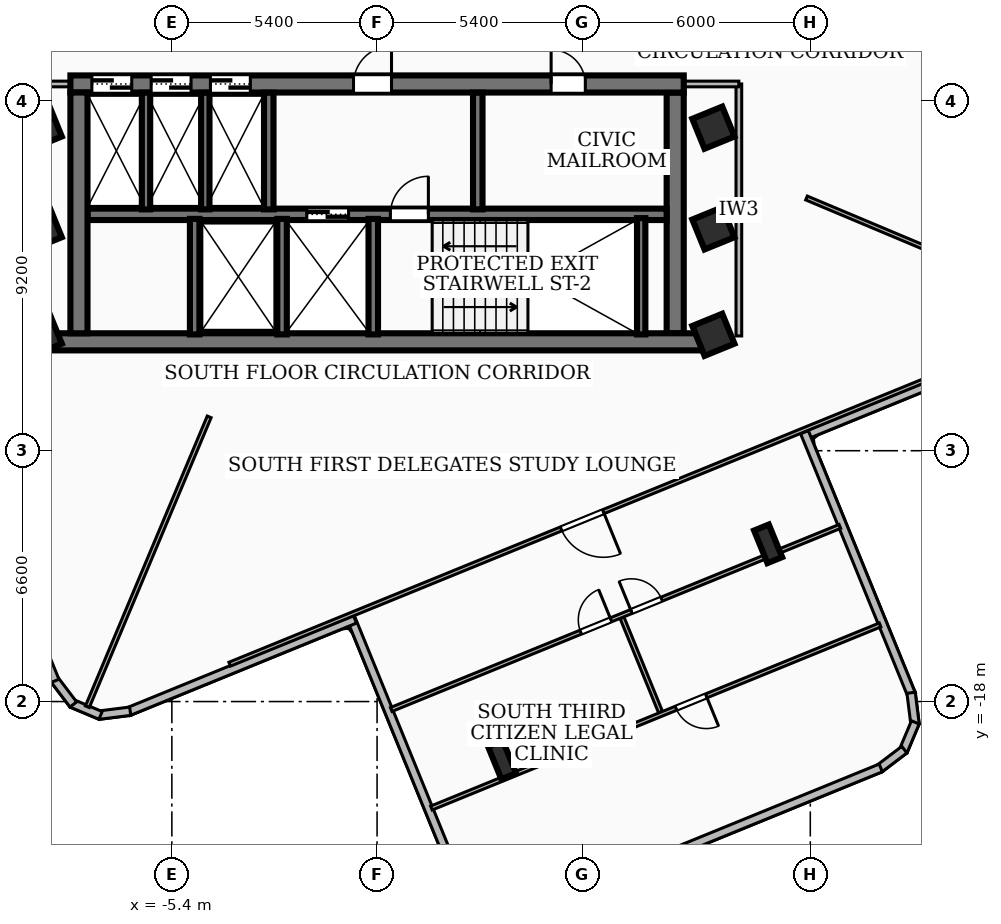
"""IFC4 building model, lengths in metres.
Left out: names, types, materials, properties, quantities, classifications, styles, units other than length and angle.
Written with IfcOpenShell. Run it as: python <this file> out.ifc"""

import sys

from ifc_helpers import new_model, si_unit, direction, frame, frame_2d, origin, origin_2d, place, context, subcontext, project, spatial, rectangle, i_section, extrude, element, fill, save


model = new_model("IFC4")
c1 = context("Model", 3, precision=1e-05, world=origin(), true_north=direction((0.0, 1.0)))
c2 = subcontext(c1, "Body", "Model", "MODEL_VIEW")
j1 = project(units=[si_unit("LENGTHUNIT", "METRE"), si_unit("PLANEANGLEUNIT", "RADIAN")], contexts=[c1])
p1 = place(None, origin())
s1 = spatial("IfcSite", under=j1, at=p1, CompositionType="ELEMENT")
p2 = place(p1, origin())
s2 = spatial("IfcBuilding", under=s1, at=p2, CompositionType="ELEMENT")
p3 = place(p2, frame((0.0, 0.0, 173.88)))
s3 = spatial("IfcBuildingStorey", under=s2, at=p3, CompositionType="ELEMENT", Elevation=173.88)
p4 = place(p3, frame((8.78, -8.535, 0.0), z_axis=(0.0, 0.0, 1.0), x_axis=(-1.0, 0.0, 0.0)))
e1 = element("IfcWall", 1, at=p4, inside=s3, PredefinedType="SHEAR", context=c2, shape_type="SweptSolid", body=[
    extrude(rectangle(XDim=17.56, YDim=0.45, at=frame_2d((8.78, 0.0))), origin(), (0.0, 0.0, 1.0), 3.34),
])
p5 = place(p3, frame((-8.07, -1.75, 0.0), z_axis=(0.0, 0.0, 1.0), x_axis=(1.0, 0.0, 0.0)))
e2 = element("IfcWall", 2, at=p5, inside=s3, PredefinedType="SHEAR", context=c2, shape_type="SweptSolid", body=[
    extrude(rectangle(XDim=16.14, YDim=0.45, at=frame_2d((8.07, 0.0))), origin(), (0.0, 0.0, 1.0), 3.34),
])
p6 = place(p5, frame((7.45, 0.0, 0.0)))
e3 = element("IfcOpeningElement", 3, at=p6, cuts=e2, PredefinedType="OPENING", context=c2, shape_type="SweptSolid", body=[
    extrude(rectangle(XDim=1.0, YDim=2.1, at=frame_2d((0.5, 1.05))), frame((0.0, 0.235, 0.0), z_axis=(0.0, -1.0, 0.0), x_axis=(1.0, 0.0, 0.0)), (0.0, 0.0, 1.0), 0.47),
])
p7 = place(p5, frame((12.65, 0.0, 0.0)))
e4 = element("IfcOpeningElement", 4, at=p7, cuts=e2, PredefinedType="OPENING", context=c2, shape_type="SweptSolid", body=[
    extrude(rectangle(XDim=0.9, YDim=2.06, at=frame_2d((0.45, 1.03))), frame((0.0, 0.235, 0.0), z_axis=(0.0, -1.0, 0.0), x_axis=(1.0, 0.0, 0.0)), (0.0, 0.0, 1.0), 0.47),
])
p8 = place(p5, frame((0.565, 0.0, 0.0)))
e5 = element("IfcOpeningElement", 5, at=p8, cuts=e2, PredefinedType="OPENING", context=c2, shape_type="SweptSolid", body=[
    extrude(rectangle(XDim=1.05, YDim=2.15, at=frame_2d((0.525, 1.075))), frame((0.0, 0.235, 0.0), z_axis=(0.0, -1.0, 0.0), x_axis=(1.0, 0.0, 0.0)), (0.0, 0.0, 1.0), 0.47),
])
p9 = place(p5, frame((2.125, 0.0, 0.0)))
e6 = element("IfcOpeningElement", 6, at=p9, cuts=e2, PredefinedType="OPENING", context=c2, shape_type="SweptSolid", body=[
    extrude(rectangle(XDim=1.05, YDim=2.15, at=frame_2d((0.525, 1.075))), frame((0.0, 0.235, 0.0), z_axis=(0.0, -1.0, 0.0), x_axis=(1.0, 0.0, 0.0)), (0.0, 0.0, 1.0), 0.47),
])
p10 = place(p5, frame((3.685, 0.0, 0.0)))
e7 = element("IfcOpeningElement", 7, at=p10, cuts=e2, PredefinedType="OPENING", context=c2, shape_type="SweptSolid", body=[
    extrude(rectangle(XDim=1.05, YDim=2.15, at=frame_2d((0.525, 1.075))), frame((0.0, 0.235, 0.0), z_axis=(0.0, -1.0, 0.0), x_axis=(1.0, 0.0, 0.0)), (0.0, 0.0, 1.0), 0.47),
])
for number, where, z_axis, x_axis in (
    (8, (-7.845, -8.31, 0.0), (0.0, 0.0, 1.0), (0.0, 1.0, 0.0)),
    (9, (7.845, -1.975, 0.0), (0.0, 0.0, 1.0), (0.0, -1.0, 0.0)),
):
    element("IfcWall", number, at=place(p3, frame(where, z_axis=z_axis, x_axis=x_axis)), inside=s3, PredefinedType="SHEAR", context=c2, shape_type="SweptSolid", body=[
        extrude(rectangle(XDim=6.335, YDim=0.45, at=frame_2d((3.167, 0.0))), origin(), (0.0, 0.0, 1.0), 3.34),
    ])
p11 = place(p3, frame((-7.62, -5.18, 0.0), z_axis=(0.0, 0.0, 1.0), x_axis=(1.0, 0.0, 0.0)))
e10 = element("IfcWall", 10, at=p11, inside=s3, PredefinedType="SOLIDWALL", context=c2, shape_type="SweptSolid", body=[
    extrude(rectangle(XDim=15.24, YDim=0.3, at=frame_2d((7.62, 0.0))), origin(), (0.0, 0.0, 1.0), 3.34),
])
p12 = place(p11, frame((5.77, 0.0, 0.0)))
e11 = element("IfcOpeningElement", 11, at=p12, cuts=e10, PredefinedType="OPENING", context=c2, shape_type="SweptSolid", body=[
    extrude(rectangle(XDim=1.1, YDim=2.15, at=frame_2d((0.55, 1.075))), frame((0.0, 0.16, 0.0), z_axis=(0.0, -1.0, 0.0), x_axis=(1.0, 0.0, 0.0)), (0.0, 0.0, 1.0), 0.32),
])
p13 = place(p11, frame((7.97, 0.0, 0.0)))
e12 = element("IfcOpeningElement", 12, at=p13, cuts=e10, PredefinedType="OPENING", context=c2, shape_type="SweptSolid", body=[
    extrude(rectangle(XDim=1.0, YDim=2.1, at=frame_2d((0.5, 1.05))), frame((0.0, 0.16, 0.0), z_axis=(0.0, -1.0, 0.0), x_axis=(1.0, 0.0, 0.0)), (0.0, 0.0, 1.0), 0.32),
])
p14 = place(p3, frame((6.95, -8.34, 0.0), z_axis=(0.0, 0.0, 1.0), x_axis=(0.0, 1.0, 0.0)))
e13 = element("IfcWall", 13, at=p14, inside=s3, PredefinedType="SOLIDWALL", context=c2, shape_type="SweptSolid", body=[
    extrude(rectangle(XDim=3.06, YDim=0.22, at=frame_2d((1.53, 0.0))), origin(), (0.0, 0.0, 1.0), 3.34),
])
for number, where, z_axis, x_axis in (
    (14, (-0.1, -8.34, 0.0), (0.0, 0.0, 1.0), (0.0, 1.0, 0.0)),
    (15, (-2.5, -8.34, 0.0), (0.0, 0.0, 1.0), (0.0, 1.0, 0.0)),
    (16, (-4.8, -8.34, 0.0), (0.0, 0.0, 1.0), (0.0, 1.0, 0.0)),
):
    element("IfcWall", number, at=place(p3, frame(where, z_axis=z_axis, x_axis=x_axis)), inside=s3, PredefinedType="SOLIDWALL", context=c2, shape_type="SweptSolid", body=[
        extrude(rectangle(XDim=3.04, YDim=0.25, at=frame_2d((1.52, 0.0))), origin(), (0.0, 0.0, 1.0), 3.34),
    ])
for number, where, z_axis, x_axis in (
    (17, (-2.85, -5.05, 0.0), (0.0, 0.0, 1.0), (0.0, 1.0, 0.0)),
    (18, (2.65, -5.05, 0.0), (0.0, 0.0, 1.0), (0.0, 1.0, 0.0)),
):
    element("IfcWall", number, at=place(p3, frame(where, z_axis=z_axis, x_axis=x_axis)), inside=s3, PredefinedType="SOLIDWALL", context=c2, shape_type="SweptSolid", body=[
        extrude(rectangle(XDim=3.07, YDim=0.25, at=frame_2d((1.535, 0.0))), origin(), (0.0, 0.0, 1.0), 3.34),
    ])
for number, where, z_axis, x_axis in (
    (19, (-6.08, -5.05, 0.0), (0.0, 0.0, 1.0), (0.0, 1.0, 0.0)),
    (20, (-4.52, -5.05, 0.0), (0.0, 0.0, 1.0), (0.0, 1.0, 0.0)),
):
    element("IfcWall", number, at=place(p3, frame(where, z_axis=z_axis, x_axis=x_axis)), inside=s3, PredefinedType="SOLIDWALL", context=c2, shape_type="SweptSolid", body=[
        extrude(rectangle(XDim=3.07, YDim=0.22, at=frame_2d((1.535, 0.0))), origin(), (0.0, 0.0, 1.0), 3.34),
    ])
for number, where, z_axis, x_axis in (
    (21, (-8.85, -5.55, 0.0), (0.0, 0.0, 1.0), (0.926, 0.378, 0.0)),
    (22, (-8.85, -2.9, 0.0), (0.0, 0.0, 1.0), (0.926, 0.378, 0.0)),
    (23, (8.85, -5.55, 0.0), (0.0, 0.0, 1.0), (0.926, 0.378, 0.0)),
    (24, (8.85, -2.9, 0.0), (0.0, 0.0, 1.0), (0.926, 0.378, 0.0)),
    (25, (8.85, -8.35, 0.0), (0.0, 0.0, 1.0), (0.926, 0.378, 0.0)),
    (26, (-8.85, -8.35, 0.0), (0.0, 0.0, 1.0), (0.926, 0.378, 0.0)),
):
    element("IfcColumn", number, at=place(p3, frame(where, z_axis=z_axis, x_axis=x_axis)), inside=s3, PredefinedType="COLUMN", context=c2, shape_type="SweptSolid", body=[
        extrude(rectangle(XDim=0.85, YDim=0.85, at=origin_2d()), origin(), (0.0, 0.0, 1.0), 3.6),
    ])
for number, where, z_axis, x_axis in (
    (27, (3.29, -19.536, 0.0), (0.0, 0.0, 1.0), (0.926, 0.378, 0.0)),
    (28, (10.29, -13.85, 0.0), (0.0, 0.0, 1.0), (0.926, 0.378, 0.0)),
):
    element("IfcColumn", number, at=place(p3, frame(where, z_axis=z_axis, x_axis=x_axis)), inside=s3, PredefinedType="COLUMN", context=c2, shape_type="SweptSolid", body=[
        extrude(i_section(OverallWidth=0.418, OverallDepth=0.927, WebThickness=0.019, FlangeThickness=0.032, at=origin_2d()), origin(), (0.0, 0.0, 1.0), 3.6),
    ])
p15 = place(p3, frame((17.456, -8.473, 0.0), z_axis=(0.0, 0.0, 1.0), x_axis=(-0.925916493636, -0.377728271133, 0.0)))
e29 = element("IfcWall", 29, at=p15, inside=s3, PredefinedType="SOLIDWALL", context=c2, shape_type="SweptSolid", body=[
    extrude(rectangle(XDim=6.759, YDim=0.22, at=frame_2d((3.379, 0.0))), origin(), (0.0, 0.0, 1.0), 3.34),
])
p16 = place(p3, frame((11.246, -10.912, 0.0), z_axis=(0.0, 0.0, 1.0), x_axis=(0.377850036169, -0.925866810166, 0.0)))
e30 = element("IfcWall", 30, at=p16, inside=s3, PredefinedType="SOLIDWALL", context=c2, shape_type="SweptSolid", body=[
    extrude(rectangle(XDim=7.458, YDim=0.22, at=frame_2d((3.729, 0.0))), origin(), (0.0, 0.0, 1.0), 3.34),
])
p17 = place(p3, frame((14.052, -17.769, 0.0), z_axis=(0.0, 0.0, 1.0), x_axis=(0.124646916858, -0.992201162123, 0.0)))
e31 = element("IfcWall", 31, at=p17, inside=s3, PredefinedType="SOLIDWALL", context=c2, shape_type="SweptSolid", body=[
    extrude(rectangle(XDim=0.834, YDim=0.22, at=frame_2d((0.417, 0.0))), origin(), (0.0, 0.0, 1.0), 3.34),
])
p18 = place(p3, frame((14.163, -18.549, 0.0), z_axis=(0.0, 0.0, 1.0), x_axis=(-0.388336782412, -0.92151752204, 0.0)))
e32 = element("IfcWall", 32, at=p18, inside=s3, PredefinedType="SOLIDWALL", context=c2, shape_type="SweptSolid", body=[
    extrude(rectangle(XDim=0.819, YDim=0.22, at=frame_2d((0.41, 0.0))), origin(), (0.0, 0.0, 1.0), 3.34),
])
p19 = place(p3, frame((13.875, -19.266, 0.0), z_axis=(0.0, 0.0, 1.0), x_axis=(-0.796613459657, -0.604489037034, 0.0)))
e33 = element("IfcWall", 33, at=p19, inside=s3, PredefinedType="SOLIDWALL", context=c2, shape_type="SweptSolid", body=[
    extrude(rectangle(XDim=0.833, YDim=0.22, at=frame_2d((0.417, 0.0))), origin(), (0.0, 0.0, 1.0), 3.34),
])
p20 = place(p3, frame((13.254, -19.746, 0.0), z_axis=(0.0, 0.0, 1.0), x_axis=(-0.925876400685, -0.377826535137, 0.0)))
e34 = element("IfcWall", 34, at=p20, inside=s3, PredefinedType="SOLIDWALL", context=c2, shape_type="SweptSolid", body=[
    extrude(rectangle(XDim=9.941, YDim=0.22, at=frame_2d((4.97, 0.0))), origin(), (0.0, 0.0, 1.0), 3.34),
])
p21 = place(p20, frame((6.854, 0.0, 0.85)))
e35 = element("IfcOpeningElement", 35, at=p21, cuts=e34, PredefinedType="OPENING", context=c2, shape_type="SweptSolid", body=[
    extrude(rectangle(XDim=1.8, YDim=1.8, at=frame_2d((0.9, 0.9))), frame((0.0, 0.12, 0.0), z_axis=(0.0, -1.0, 0.0), x_axis=(1.0, 0.0, 0.0)), (0.0, 0.0, 1.0), 0.24),
])
p22 = place(p3, frame((2.12, -22.691, 0.0), z_axis=(0.0, 0.0, 1.0), x_axis=(-0.377754391584, 0.92590583735, 0.0)))
e36 = element("IfcWall", 36, at=p22, inside=s3, PredefinedType="SOLIDWALL", context=c2, shape_type="SweptSolid", body=[
    extrude(rectangle(XDim=7.458, YDim=0.22, at=frame_2d((3.729, 0.0))), origin(), (0.0, 0.0, 1.0), 2.644),
])
p23 = place(p3, frame((-0.583, -15.834, 0.0), z_axis=(0.0, 0.0, 1.0), x_axis=(-0.925896916469, -0.377776256629, 0.0)))
e37 = element("IfcWall", 37, at=p23, inside=s3, PredefinedType="SOLIDWALL", context=c2, shape_type="SweptSolid", body=[
    extrude(rectangle(XDim=6.438, YDim=0.22, at=frame_2d((3.219, 0.0))), origin(), (0.0, 0.0, 1.0), 2.644),
])
p24 = place(p3, frame((-6.496, -18.254, 0.0), z_axis=(0.0, 0.0, 1.0), x_axis=(-0.992201162123, -0.124646916858, 0.0)))
e38 = element("IfcWall", 38, at=p24, inside=s3, PredefinedType="SOLIDWALL", context=c2, shape_type="SweptSolid", body=[
    extrude(rectangle(XDim=0.834, YDim=0.22, at=frame_2d((0.417, 0.0))), origin(), (0.0, 0.0, 1.0), 3.34),
])
p25 = place(p3, frame((-7.276, -18.365, 0.0), z_axis=(0.0, 0.0, 1.0), x_axis=(-0.9216690265, 0.387977068381, 0.0)))
e39 = element("IfcWall", 39, at=p25, inside=s3, PredefinedType="SOLIDWALL", context=c2, shape_type="SweptSolid", body=[
    extrude(rectangle(XDim=0.819, YDim=0.22, at=frame_2d((0.41, 0.0))), origin(), (0.0, 0.0, 1.0), 3.34),
])
p26 = place(p3, frame((-7.993, -18.077, 0.0), z_axis=(0.0, 0.0, 1.0), x_axis=(-0.604815890473, 0.796365329878, 0.0)))
e40 = element("IfcWall", 40, at=p26, inside=s3, PredefinedType="SOLIDWALL", context=c2, shape_type="SweptSolid", body=[
    extrude(rectangle(XDim=0.833, YDim=0.22, at=frame_2d((0.417, 0.0))), origin(), (0.0, 0.0, 1.0), 3.34),
])
p27 = place(p3, frame((-8.473, -17.456, 0.0), z_axis=(0.0, 0.0, 1.0), x_axis=(-0.377728271133, 0.925916493636, 0.0)))
e41 = element("IfcWall", 41, at=p27, inside=s3, PredefinedType="SOLIDWALL", context=c2, shape_type="SweptSolid", body=[
    extrude(rectangle(XDim=6.759, YDim=0.22, at=frame_2d((3.379, 0.0))), origin(), (0.0, 0.0, 1.0), 2.72),
])
p28 = place(p3, frame((-7.85, -1.75, 0.0), z_axis=(0.0, 0.0, 1.0), x_axis=(-1.0, 0.0, 0.0)))
e42 = element("IfcWall", 42, at=p28, inside=s3, PredefinedType="PARTITIONING", context=c2, shape_type="SweptSolid", body=[
    extrude(rectangle(XDim=1.67, YDim=0.15, at=frame_2d((0.835, 0.0))), origin(), (0.0, 0.0, 1.0), 2.57),
])
p29 = place(p3, frame((9.52, -8.38, 0.0), z_axis=(0.0, 0.0, 1.0), x_axis=(0.0, 1.0, 0.0)))
e43 = element("IfcWall", 43, at=p29, inside=s3, PredefinedType="PARTITIONING", context=c2, shape_type="SweptSolid", body=[
    extrude(rectangle(XDim=6.63, YDim=0.15, at=frame_2d((3.315, 0.0))), origin(), (0.0, 0.0, 1.0), 3.34),
])
p30 = place(p3, frame((7.85, -1.75, 0.0), z_axis=(0.0, 0.0, 1.0), x_axis=(1.0, 0.0, 0.0)))
e44 = element("IfcWall", 44, at=p30, inside=s3, PredefinedType="PARTITIONING", context=c2, shape_type="SweptSolid", body=[
    extrude(rectangle(XDim=1.67, YDim=0.15, at=frame_2d((0.835, 0.0))), origin(), (0.0, 0.0, 1.0), 2.57),
])
p31 = place(p3, frame((-4.418, -10.509, 0.0), z_axis=(0.0, 0.0, 1.0), x_axis=(-0.387471247296, -0.921881788799, 0.0)))
e45 = element("IfcWall", 45, at=p31, inside=s3, PredefinedType="PARTITIONING", context=c2, shape_type="SweptSolid", body=[
    extrude(rectangle(XDim=8.274, YDim=0.11, at=frame_2d((4.137, 0.0))), origin(), (0.0, 0.0, 1.0), 2.644),
])
p32 = place(p3, frame((11.3, -4.75, 0.0), z_axis=(0.0, 0.0, 1.0), x_axis=(0.92186077199, -0.387521247245, 0.0)))
e46 = element("IfcWall", 46, at=p32, inside=s3, PredefinedType="PARTITIONING", context=c2, shape_type="SweptSolid", body=[
    extrude(rectangle(XDim=7.417, YDim=0.11, at=frame_2d((3.708, 0.0))), origin(), (0.0, 0.0, 1.0), 3.34),
])
p33 = place(p3, frame((9.323, 14.973, 0.0), z_axis=(0.0, 0.0, 1.0), x_axis=(0.377891753295, -0.92584978414, 0.0)))
e47 = element("IfcWall", 47, at=p33, inside=s3, PredefinedType="PARTITIONING", context=c2, shape_type="SweptSolid", body=[
    extrude(rectangle(XDim=20.361, YDim=0.11, at=frame_2d((10.18, 0.0))), origin(), (0.0, 0.0, 1.0), 2.644),
])
p34 = place(p33, frame((9.741, 0.0, 0.0)))
e48 = element("IfcOpeningElement", 48, at=p34, cuts=e47, PredefinedType="OPENING", context=c2, shape_type="SweptSolid", body=[
    extrude(rectangle(XDim=1.2, YDim=2.1, at=frame_2d((0.6, 1.05))), frame((0.0, 0.065, 0.0), z_axis=(0.0, -1.0, 0.0), x_axis=(1.0, 0.0, 0.0)), (0.0, 0.0, 1.0), 0.13),
])
p35 = place(p3, frame((14.973, -9.323, 0.0), z_axis=(0.0, 0.0, 1.0), x_axis=(-0.92584978414, -0.377891753295, 0.0)))
e49 = element("IfcWall", 49, at=p35, inside=s3, PredefinedType="PARTITIONING", context=c2, shape_type="SweptSolid", body=[
    extrude(rectangle(XDim=20.361, YDim=0.11, at=frame_2d((10.18, 0.0))), origin(), (0.0, 0.0, 1.0), 2.644),
])
p36 = place(p35, frame((9.741, 0.0, 0.0)))
e50 = element("IfcOpeningElement", 50, at=p36, cuts=e49, PredefinedType="OPENING", context=c2, shape_type="SweptSolid", body=[
    extrude(rectangle(XDim=1.2, YDim=2.1, at=frame_2d((0.6, 1.05))), frame((0.0, 0.065, 0.0), z_axis=(0.0, -1.0, 0.0), x_axis=(1.0, 0.0, 0.0)), (0.0, 0.0, 1.0), 0.13),
])
p37 = place(p3, frame((6.446, -15.795, 0.0), z_axis=(0.0, 0.0, 1.0), x_axis=(0.377834865886, -0.925873001076, 0.0)))
e51 = element("IfcWall", 51, at=p37, inside=s3, PredefinedType="PARTITIONING", context=c2, shape_type="SweptSolid", body=[
    extrude(rectangle(XDim=2.681, YDim=0.11, at=frame_2d((1.34, 0.0))), origin(), (0.0, 0.0, 1.0), 3.34),
])
p38 = place(p3, frame((0.373, -18.209, 0.0), z_axis=(0.0, 0.0, 1.0), x_axis=(0.925887289182, 0.377799851417, 0.0)))
e52 = element("IfcWall", 52, at=p38, inside=s3, PredefinedType="PARTITIONING", context=c2, shape_type="SweptSolid", body=[
    extrude(rectangle(XDim=12.75, YDim=0.11, at=frame_2d((6.375, 0.0))), origin(), (0.0, 0.0, 1.0), 2.644),
])
p39 = place(p38, frame((5.385, 0.0, 0.0)))
e53 = element("IfcOpeningElement", 53, at=p39, cuts=e52, PredefinedType="OPENING", context=c2, shape_type="SweptSolid", body=[
    extrude(rectangle(XDim=0.86, YDim=2.04, at=frame_2d((0.43, 1.02))), frame((0.0, 0.065, 0.0), z_axis=(0.0, -1.0, 0.0), x_axis=(1.0, 0.0, 0.0)), (0.0, 0.0, 1.0), 0.13),
])
p40 = place(p38, frame((6.825, 0.0, 0.0)))
e54 = element("IfcOpeningElement", 54, at=p40, cuts=e52, PredefinedType="OPENING", context=c2, shape_type="SweptSolid", body=[
    extrude(rectangle(XDim=0.86, YDim=2.04, at=frame_2d((0.43, 1.02))), frame((0.0, 0.065, 0.0), z_axis=(0.0, -1.0, 0.0), x_axis=(1.0, 0.0, 0.0)), (0.0, 0.0, 1.0), 0.13),
])
p41 = place(p3, frame((13.236, -15.984, 0.0), z_axis=(0.0, 0.0, 1.0), x_axis=(-0.92585653016, -0.377875224856, 0.0)))
e55 = element("IfcWall", 55, at=p41, inside=s3, PredefinedType="PARTITIONING", context=c2, shape_type="SweptSolid", body=[
    extrude(rectangle(XDim=12.75, YDim=0.11, at=frame_2d((6.375, 0.0))), origin(), (0.0, 0.0, 1.0), 3.34),
])
p42 = place(p41, frame((4.94, 0.0, 0.0)))
e56 = element("IfcOpeningElement", 56, at=p42, cuts=e55, PredefinedType="OPENING", context=c2, shape_type="SweptSolid", body=[
    extrude(rectangle(XDim=0.86, YDim=2.04, at=frame_2d((0.43, 1.02))), frame((0.0, 0.065, 0.0), z_axis=(0.0, -1.0, 0.0), x_axis=(1.0, 0.0, 0.0)), (0.0, 0.0, 1.0), 0.13),
])
p43 = place(p6, origin())
e57 = element("IfcDoor", 57, at=p43, inside=s3, OperationType="SINGLE_SWING_RIGHT", PredefinedType="DOOR", context=c2, shape_type="SweptSolid", body=[
    extrude(rectangle(XDim=1.0, YDim=2.1, at=frame_2d((0.5, 1.05))), frame((0.0, 0.025, 0.0), z_axis=(0.0, -1.0, 0.0), x_axis=(1.0, 0.0, 0.0)), (0.0, 0.0, 1.0), 0.05),
])
fill(e3, e57)
p44 = place(p12, origin())
e58 = element("IfcDoor", 58, at=p44, inside=s3, OperationType="DOUBLE_DOOR_SLIDING", PredefinedType="DOOR", context=c2, shape_type="SweptSolid", body=[
    extrude(rectangle(XDim=1.1, YDim=2.15, at=frame_2d((0.55, 1.075))), frame((0.0, 0.025, 0.0), z_axis=(0.0, -1.0, 0.0), x_axis=(1.0, 0.0, 0.0)), (0.0, 0.0, 1.0), 0.05),
])
fill(e11, e58)
p45 = place(p13, origin())
e59 = element("IfcDoor", 59, at=p45, inside=s3, OperationType="SINGLE_SWING_RIGHT", PredefinedType="DOOR", context=c2, shape_type="SweptSolid", body=[
    extrude(rectangle(XDim=1.0, YDim=2.1, at=frame_2d((0.5, 1.05))), frame((0.0, 0.025, 0.0), z_axis=(0.0, -1.0, 0.0), x_axis=(1.0, 0.0, 0.0)), (0.0, 0.0, 1.0), 0.05),
])
fill(e12, e59)
p46 = place(p7, origin())
e60 = element("IfcDoor", 60, at=p46, inside=s3, OperationType="SINGLE_SWING_LEFT", PredefinedType="DOOR", context=c2, shape_type="SweptSolid", body=[
    extrude(rectangle(XDim=0.9, YDim=2.06, at=frame_2d((0.45, 1.03))), frame((0.0, 0.025, 0.0), z_axis=(0.0, -1.0, 0.0), x_axis=(1.0, 0.0, 0.0)), (0.0, 0.0, 1.0), 0.05),
])
fill(e4, e60)
p47 = place(p8, origin())
e61 = element("IfcDoor", 61, at=p47, inside=s3, OperationType="DOUBLE_DOOR_SLIDING", PredefinedType="DOOR", context=c2, shape_type="SweptSolid", body=[
    extrude(rectangle(XDim=1.05, YDim=2.15, at=frame_2d((0.525, 1.075))), frame((0.0, 0.025, 0.0), z_axis=(0.0, -1.0, 0.0), x_axis=(1.0, 0.0, 0.0)), (0.0, 0.0, 1.0), 0.05),
])
fill(e5, e61)
p48 = place(p9, origin())
e62 = element("IfcDoor", 62, at=p48, inside=s3, OperationType="DOUBLE_DOOR_SLIDING", PredefinedType="DOOR", context=c2, shape_type="SweptSolid", body=[
    extrude(rectangle(XDim=1.05, YDim=2.15, at=frame_2d((0.525, 1.075))), frame((0.0, 0.025, 0.0), z_axis=(0.0, -1.0, 0.0), x_axis=(1.0, 0.0, 0.0)), (0.0, 0.0, 1.0), 0.05),
])
fill(e6, e62)
p49 = place(p10, origin())
e63 = element("IfcDoor", 63, at=p49, inside=s3, OperationType="DOUBLE_DOOR_SLIDING", PredefinedType="DOOR", context=c2, shape_type="SweptSolid", body=[
    extrude(rectangle(XDim=1.05, YDim=2.15, at=frame_2d((0.525, 1.075))), frame((0.0, 0.025, 0.0), z_axis=(0.0, -1.0, 0.0), x_axis=(1.0, 0.0, 0.0)), (0.0, 0.0, 1.0), 0.05),
])
fill(e7, e63)
p50 = place(p36, origin())
e64 = element("IfcDoor", 64, at=p50, inside=s3, OperationType="SINGLE_SWING_LEFT", PredefinedType="DOOR", context=c2, shape_type="SweptSolid", body=[
    extrude(rectangle(XDim=1.2, YDim=2.1, at=frame_2d((0.6, 1.05))), frame((0.0, 0.025, 0.0), z_axis=(0.0, -1.0, 0.0), x_axis=(1.0, 0.0, 0.0)), (0.0, 0.0, 1.0), 0.05),
])
fill(e50, e64)
p51 = place(p39, origin())
e65 = element("IfcDoor", 65, at=p51, inside=s3, OperationType="SINGLE_SWING_RIGHT", PredefinedType="DOOR", context=c2, shape_type="SweptSolid", body=[
    extrude(rectangle(XDim=0.86, YDim=2.04, at=frame_2d((0.43, 1.02))), frame((0.0, 0.025, 0.0), z_axis=(0.0, -1.0, 0.0), x_axis=(1.0, 0.0, 0.0)), (0.0, 0.0, 1.0), 0.05),
])
fill(e53, e65)
p52 = place(p40, origin())
e66 = element("IfcDoor", 66, at=p52, inside=s3, OperationType="SINGLE_SWING_LEFT", PredefinedType="DOOR", context=c2, shape_type="SweptSolid", body=[
    extrude(rectangle(XDim=0.86, YDim=2.04, at=frame_2d((0.43, 1.02))), frame((0.0, 0.025, 0.0), z_axis=(0.0, -1.0, 0.0), x_axis=(1.0, 0.0, 0.0)), (0.0, 0.0, 1.0), 0.05),
])
fill(e54, e66)
p53 = place(p42, origin())
e67 = element("IfcDoor", 67, at=p53, inside=s3, OperationType="SINGLE_SWING_LEFT", PredefinedType="DOOR", context=c2, shape_type="SweptSolid", body=[
    extrude(rectangle(XDim=0.86, YDim=2.04, at=frame_2d((0.43, 1.02))), frame((0.0, 0.025, 0.0), z_axis=(0.0, -1.0, 0.0), x_axis=(1.0, 0.0, 0.0)), (0.0, 0.0, 1.0), 0.05),
])
fill(e56, e67)
save(model, sys.argv[1])
